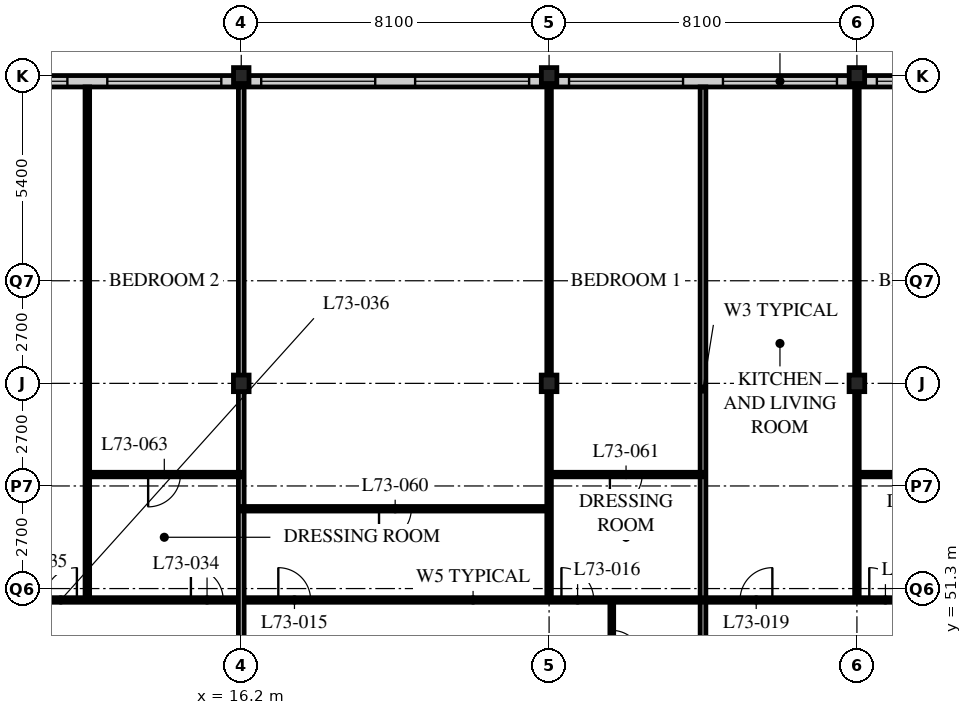
"""IFC4 building model, lengths in metres.
Left out: names, types, materials, properties, quantities, classifications, styles, units other than length and angle.
Written with IfcOpenShell. Run it as: python <this file> out.ifc"""

import sys

from ifc_helpers import new_model, si_unit, direction, frame, frame_2d, origin, origin_2d, place, context, subcontext, project, spatial, rectangle, i_section, extrude, element, fill, save


model = new_model("IFC4")
c1 = context("Model", 3, precision=1e-05, world=origin(), true_north=direction((0.0, 1.0)))
c2 = subcontext(c1, "Body", "Model", "MODEL_VIEW")
j1 = project(units=[si_unit("LENGTHUNIT", "METRE"), si_unit("PLANEANGLEUNIT", "RADIAN")], contexts=[c1])
p1 = place(None, origin())
s1 = spatial("IfcSite", under=j1, at=p1, CompositionType="ELEMENT")
p2 = place(p1, origin())
s2 = spatial("IfcBuilding", under=s1, at=p2, CompositionType="ELEMENT")
p3 = place(p2, frame((0.0, 0.0, 285.3)))
s3 = spatial("IfcBuildingStorey", under=s2, at=p3, CompositionType="ELEMENT", Elevation=285.3)
p4 = place(p3, frame((16.2, 56.7, 0.0), z_axis=(0.0, 0.0, 1.0), x_axis=(1.0, 0.0, 0.0)))
e1 = element("IfcColumn", 1, at=p4, inside=s3, PredefinedType="COLUMN", context=c2, shape_type="SweptSolid", body=[
    extrude(i_section(OverallWidth=0.412, OverallDepth=0.437, WebThickness=0.036, FlangeThickness=0.058, FilletRadius=0.015, at=origin_2d()), origin(), (0.0, 0.0, 1.0), 3.9),
])
p5 = place(p3, frame((16.2, 64.8, 0.0), z_axis=(0.0, 0.0, 1.0), x_axis=(1.0, 0.0, 0.0)))
e2 = element("IfcColumn", 2, at=p5, inside=s3, PredefinedType="COLUMN", context=c2, shape_type="SweptSolid", body=[
    extrude(i_section(OverallWidth=0.407, OverallDepth=0.419, WebThickness=0.031, FlangeThickness=0.049, FilletRadius=0.015, at=origin_2d()), origin(), (0.0, 0.0, 1.0), 3.9),
])
p6 = place(p3, frame((24.3, 56.7, 0.0), z_axis=(0.0, 0.0, 1.0), x_axis=(1.0, 0.0, 0.0)))
e3 = element("IfcColumn", 3, at=p6, inside=s3, PredefinedType="COLUMN", context=c2, shape_type="SweptSolid", body=[
    extrude(i_section(OverallWidth=0.412, OverallDepth=0.437, WebThickness=0.036, FlangeThickness=0.058, FilletRadius=0.015, at=origin_2d()), origin(), (0.0, 0.0, 1.0), 3.9),
])
p7 = place(p3, frame((24.3, 64.8, 0.0), z_axis=(0.0, 0.0, 1.0), x_axis=(1.0, 0.0, 0.0)))
e4 = element("IfcColumn", 4, at=p7, inside=s3, PredefinedType="COLUMN", context=c2, shape_type="SweptSolid", body=[
    extrude(i_section(OverallWidth=0.407, OverallDepth=0.419, WebThickness=0.031, FlangeThickness=0.049, FilletRadius=0.015, at=origin_2d()), origin(), (0.0, 0.0, 1.0), 3.9),
])
p8 = place(p3, frame((32.4, 56.7, 0.0), z_axis=(0.0, 0.0, 1.0), x_axis=(1.0, 0.0, 0.0)))
e5 = element("IfcColumn", 5, at=p8, inside=s3, PredefinedType="COLUMN", context=c2, shape_type="SweptSolid", body=[
    extrude(i_section(OverallWidth=0.412, OverallDepth=0.437, WebThickness=0.036, FlangeThickness=0.058, FilletRadius=0.015, at=origin_2d()), origin(), (0.0, 0.0, 1.0), 3.9),
])
p9 = place(p3, frame((32.4, 64.8, 0.0), z_axis=(0.0, 0.0, 1.0), x_axis=(1.0, 0.0, 0.0)))
e6 = element("IfcColumn", 6, at=p9, inside=s3, PredefinedType="COLUMN", context=c2, shape_type="SweptSolid", body=[
    extrude(i_section(OverallWidth=0.407, OverallDepth=0.419, WebThickness=0.031, FlangeThickness=0.049, FilletRadius=0.015, at=origin_2d()), origin(), (0.0, 0.0, 1.0), 3.9),
])
p10 = place(p3, frame((48.3, 64.65, 0.0), z_axis=(0.0, 0.0, 1.0), x_axis=(-1.0, 0.0, 0.0)))
e7 = element("IfcWall", 7, at=p10, inside=s3, PredefinedType="SOLIDWALL", context=c2, shape_type="SweptSolid", body=[
    extrude(rectangle(XDim=40.2, YDim=0.3, at=frame_2d((20.1, 0.0))), origin(), (0.0, 0.0, 1.0), 3.69),
])
p11 = place(p10, frame((0.225, 0.0, 0.6)))
e8 = element("IfcOpeningElement", 8, at=p11, cuts=e7, PredefinedType="OPENING", context=c2, shape_type="SweptSolid", body=[
    extrude(rectangle(XDim=3.0, YDim=2.4, at=frame_2d((1.5, 1.2))), frame((0.0, 0.16, 0.0), z_axis=(0.0, -1.0, 0.0), x_axis=(1.0, 0.0, 0.0)), (0.0, 0.0, 1.0), 0.32),
])
p12 = place(p10, frame((4.275, 0.0, 0.6)))
e9 = element("IfcOpeningElement", 9, at=p12, cuts=e7, PredefinedType="OPENING", context=c2, shape_type="SweptSolid", body=[
    extrude(rectangle(XDim=3.0, YDim=2.4, at=frame_2d((1.5, 1.2))), frame((0.0, 0.16, 0.0), z_axis=(0.0, -1.0, 0.0), x_axis=(1.0, 0.0, 0.0)), (0.0, 0.0, 1.0), 0.32),
])
p13 = place(p10, frame((8.325, 0.0, 0.6)))
e10 = element("IfcOpeningElement", 10, at=p13, cuts=e7, PredefinedType="OPENING", context=c2, shape_type="SweptSolid", body=[
    extrude(rectangle(XDim=3.0, YDim=2.4, at=frame_2d((1.5, 1.2))), frame((0.0, 0.16, 0.0), z_axis=(0.0, -1.0, 0.0), x_axis=(1.0, 0.0, 0.0)), (0.0, 0.0, 1.0), 0.32),
])
p14 = place(p10, frame((12.375, 0.0, 0.6)))
e11 = element("IfcOpeningElement", 11, at=p14, cuts=e7, PredefinedType="OPENING", context=c2, shape_type="SweptSolid", body=[
    extrude(rectangle(XDim=3.0, YDim=2.4, at=frame_2d((1.5, 1.2))), frame((0.0, 0.16, 0.0), z_axis=(0.0, -1.0, 0.0), x_axis=(1.0, 0.0, 0.0)), (0.0, 0.0, 1.0), 0.32),
])
p15 = place(p10, frame((16.425, 0.0, 0.6)))
e12 = element("IfcOpeningElement", 12, at=p15, cuts=e7, PredefinedType="OPENING", context=c2, shape_type="SweptSolid", body=[
    extrude(rectangle(XDim=3.0, YDim=2.4, at=frame_2d((1.5, 1.2))), frame((0.0, 0.16, 0.0), z_axis=(0.0, -1.0, 0.0), x_axis=(1.0, 0.0, 0.0)), (0.0, 0.0, 1.0), 0.32),
])
p16 = place(p10, frame((20.475, 0.0, 0.6)))
e13 = element("IfcOpeningElement", 13, at=p16, cuts=e7, PredefinedType="OPENING", context=c2, shape_type="SweptSolid", body=[
    extrude(rectangle(XDim=3.0, YDim=2.4, at=frame_2d((1.5, 1.2))), frame((0.0, 0.16, 0.0), z_axis=(0.0, -1.0, 0.0), x_axis=(1.0, 0.0, 0.0)), (0.0, 0.0, 1.0), 0.32),
])
p17 = place(p10, frame((24.525, 0.0, 0.6)))
e14 = element("IfcOpeningElement", 14, at=p17, cuts=e7, PredefinedType="OPENING", context=c2, shape_type="SweptSolid", body=[
    extrude(rectangle(XDim=3.0, YDim=2.4, at=frame_2d((1.5, 1.2))), frame((0.0, 0.16, 0.0), z_axis=(0.0, -1.0, 0.0), x_axis=(1.0, 0.0, 0.0)), (0.0, 0.0, 1.0), 0.32),
])
p18 = place(p10, frame((28.575, 0.0, 0.6)))
e15 = element("IfcOpeningElement", 15, at=p18, cuts=e7, PredefinedType="OPENING", context=c2, shape_type="SweptSolid", body=[
    extrude(rectangle(XDim=3.0, YDim=2.4, at=frame_2d((1.5, 1.2))), frame((0.0, 0.16, 0.0), z_axis=(0.0, -1.0, 0.0), x_axis=(1.0, 0.0, 0.0)), (0.0, 0.0, 1.0), 0.32),
])
p19 = place(p10, frame((32.625, 0.0, 0.6)))
e16 = element("IfcOpeningElement", 16, at=p19, cuts=e7, PredefinedType="OPENING", context=c2, shape_type="SweptSolid", body=[
    extrude(rectangle(XDim=3.0, YDim=2.4, at=frame_2d((1.5, 1.2))), frame((0.0, 0.16, 0.0), z_axis=(0.0, -1.0, 0.0), x_axis=(1.0, 0.0, 0.0)), (0.0, 0.0, 1.0), 0.32),
])
p20 = place(p10, frame((36.675, 0.0, 0.6)))
e17 = element("IfcOpeningElement", 17, at=p20, cuts=e7, PredefinedType="OPENING", context=c2, shape_type="SweptSolid", body=[
    extrude(rectangle(XDim=3.0, YDim=2.4, at=frame_2d((1.5, 1.2))), frame((0.0, 0.16, 0.0), z_axis=(0.0, -1.0, 0.0), x_axis=(1.0, 0.0, 0.0)), (0.0, 0.0, 1.0), 0.32),
])
p21 = place(p3, frame((25.95, 48.6, 0.0), z_axis=(0.0, 0.0, 1.0), x_axis=(0.0, 1.0, 0.0)))
e18 = element("IfcWall", 18, at=p21, inside=s3, PredefinedType="PARTITIONING", context=c2, shape_type="SweptSolid", body=[
    extrude(rectangle(XDim=2.4, YDim=0.1, at=frame_2d((1.2, 0.0))), origin(), (0.0, 0.0, 1.0), 3.69),
])
p22 = place(p21, frame((0.8, 0.0, 0.0)))
e19 = element("IfcOpeningElement", 19, at=p22, cuts=e18, PredefinedType="OPENING", context=c2, shape_type="SweptSolid", body=[
    extrude(rectangle(XDim=0.8, YDim=2.1, at=frame_2d((0.4, 1.05))), frame((0.0, 0.06, 0.0), z_axis=(0.0, -1.0, 0.0), x_axis=(1.0, 0.0, 0.0)), (0.0, 0.0, 1.0), 0.12),
])
p23 = place(p3, frame((24.3, 51.0, 0.0), z_axis=(0.0, 0.0, 1.0), x_axis=(0.0, 1.0, 0.0)))
e20 = element("IfcWall", 20, at=p23, inside=s3, PredefinedType="PARTITIONING", context=c2, shape_type="SweptSolid", body=[
    extrude(rectangle(XDim=13.5, YDim=0.12, at=frame_2d((6.75, 0.0))), origin(), (0.0, 0.0, 1.0), 3.078),
])
p24 = place(p3, frame((28.35, 48.6, 0.0), z_axis=(0.0, 0.0, 1.0), x_axis=(0.0, 1.0, 0.0)))
e21 = element("IfcWall", 21, at=p24, inside=s3, PredefinedType="PARTITIONING", context=c2, shape_type="SweptSolid", body=[
    extrude(rectangle(XDim=15.9, YDim=0.15, at=frame_2d((7.95, 0.0))), origin(), (0.0, 0.0, 1.0), 3.69),
])
p25 = place(p3, frame((32.4, 51.0, 0.0), z_axis=(0.0, 0.0, 1.0), x_axis=(0.0, 1.0, 0.0)))
e22 = element("IfcWall", 22, at=p25, inside=s3, PredefinedType="PARTITIONING", context=c2, shape_type="SweptSolid", body=[
    extrude(rectangle(XDim=13.5, YDim=0.12, at=frame_2d((6.75, 0.0))), origin(), (0.0, 0.0, 1.0), 3.078),
])
p26 = place(p3, frame((8.15, 51.0, 0.0), z_axis=(0.0, 0.0, 1.0), x_axis=(1.0, 0.0, 0.0)))
e23 = element("IfcWall", 23, at=p26, inside=s3, PredefinedType="PARTITIONING", context=c2, shape_type="SweptSolid", body=[
    extrude(rectangle(XDim=28.3, YDim=0.12, at=frame_2d((14.15, 0.0))), origin(), (0.0, 0.0, 1.0), 3.69),
])
p27 = place(p26, frame((9.025, 0.0, 0.0)))
e24 = element("IfcOpeningElement", 24, at=p27, cuts=e23, PredefinedType="OPENING", context=c2, shape_type="SweptSolid", body=[
    extrude(rectangle(XDim=0.85, YDim=2.1, at=frame_2d((0.425, 1.05))), frame((0.0, 0.07, 0.0), z_axis=(0.0, -1.0, 0.0), x_axis=(1.0, 0.0, 0.0)), (0.0, 0.0, 1.0), 0.14),
])
p28 = place(p26, frame((16.475, 0.0, 0.0)))
e25 = element("IfcOpeningElement", 25, at=p28, cuts=e23, PredefinedType="OPENING", context=c2, shape_type="SweptSolid", body=[
    extrude(rectangle(XDim=0.85, YDim=2.1, at=frame_2d((0.425, 1.05))), frame((0.0, 0.07, 0.0), z_axis=(0.0, -1.0, 0.0), x_axis=(1.0, 0.0, 0.0)), (0.0, 0.0, 1.0), 0.14),
])
p29 = place(p26, frame((21.175, 0.0, 0.0)))
e26 = element("IfcOpeningElement", 26, at=p29, cuts=e23, PredefinedType="OPENING", context=c2, shape_type="SweptSolid", body=[
    extrude(rectangle(XDim=0.85, YDim=2.1, at=frame_2d((0.425, 1.05))), frame((0.0, 0.07, 0.0), z_axis=(0.0, -1.0, 0.0), x_axis=(1.0, 0.0, 0.0)), (0.0, 0.0, 1.0), 0.14),
])
p30 = place(p26, frame((24.575, 0.0, 0.0)))
e27 = element("IfcOpeningElement", 27, at=p30, cuts=e23, PredefinedType="OPENING", context=c2, shape_type="SweptSolid", body=[
    extrude(rectangle(XDim=0.85, YDim=2.1, at=frame_2d((0.425, 1.05))), frame((0.0, 0.07, 0.0), z_axis=(0.0, -1.0, 0.0), x_axis=(1.0, 0.0, 0.0)), (0.0, 0.0, 1.0), 0.14),
])
p31 = place(p26, frame((6.725, 0.0, 0.0)))
e28 = element("IfcOpeningElement", 28, at=p31, cuts=e23, PredefinedType="OPENING", context=c2, shape_type="SweptSolid", body=[
    extrude(rectangle(XDim=0.85, YDim=2.1, at=frame_2d((0.425, 1.05))), frame((0.0, 0.07, 0.0), z_axis=(0.0, -1.0, 0.0), x_axis=(1.0, 0.0, 0.0)), (0.0, 0.0, 1.0), 0.14),
])
p32 = place(p26, frame((2.875, 0.0, 0.0)))
e29 = element("IfcOpeningElement", 29, at=p32, cuts=e23, PredefinedType="OPENING", context=c2, shape_type="SweptSolid", body=[
    extrude(rectangle(XDim=0.85, YDim=2.1, at=frame_2d((0.425, 1.05))), frame((0.0, 0.07, 0.0), z_axis=(0.0, -1.0, 0.0), x_axis=(1.0, 0.0, 0.0)), (0.0, 0.0, 1.0), 0.14),
])
p33 = place(p3, frame((12.15, 51.0, 0.0), z_axis=(0.0, 0.0, 1.0), x_axis=(0.0, 1.0, 0.0)))
e30 = element("IfcWall", 30, at=p33, inside=s3, PredefinedType="PARTITIONING", context=c2, shape_type="SweptSolid", body=[
    extrude(rectangle(XDim=13.5, YDim=0.12, at=frame_2d((6.75, 0.0))), origin(), (0.0, 0.0, 1.0), 3.69),
])
p34 = place(p3, frame((16.2, 48.6, 0.0), z_axis=(0.0, 0.0, 1.0), x_axis=(0.0, 1.0, 0.0)))
e31 = element("IfcWall", 31, at=p34, inside=s3, PredefinedType="PARTITIONING", context=c2, shape_type="SweptSolid", body=[
    extrude(rectangle(XDim=15.9, YDim=0.15, at=frame_2d((7.95, 0.0))), origin(), (0.0, 0.0, 1.0), 3.078),
])
p35 = place(p3, frame((16.2, 53.4, 0.0), z_axis=(0.0, 0.0, 1.0), x_axis=(1.0, 0.0, 0.0)))
e32 = element("IfcWall", 32, at=p35, inside=s3, PredefinedType="PARTITIONING", context=c2, shape_type="SweptSolid", body=[
    extrude(rectangle(XDim=8.1, YDim=0.12, at=frame_2d((4.05, 0.0))), origin(), (0.0, 0.0, 1.0), 3.69),
])
p36 = place(p35, frame((3.625, 0.0, 0.0)))
e33 = element("IfcOpeningElement", 33, at=p36, cuts=e32, PredefinedType="OPENING", context=c2, shape_type="SweptSolid", body=[
    extrude(rectangle(XDim=0.85, YDim=2.1, at=frame_2d((0.425, 1.05))), frame((0.0, 0.07, 0.0), z_axis=(0.0, -1.0, 0.0), x_axis=(1.0, 0.0, 0.0)), (0.0, 0.0, 1.0), 0.14),
])
p37 = place(p3, frame((24.3, 54.3, 0.0), z_axis=(0.0, 0.0, 1.0), x_axis=(1.0, 0.0, 0.0)))
e34 = element("IfcWall", 34, at=p37, inside=s3, PredefinedType="PARTITIONING", context=c2, shape_type="SweptSolid", body=[
    extrude(rectangle(XDim=4.05, YDim=0.12, at=frame_2d((2.025, 0.0))), origin(), (0.0, 0.0, 1.0), 3.69),
])
p38 = place(p37, frame((1.6, 0.0, 0.0)))
e35 = element("IfcOpeningElement", 35, at=p38, cuts=e34, PredefinedType="OPENING", context=c2, shape_type="SweptSolid", body=[
    extrude(rectangle(XDim=0.85, YDim=2.1, at=frame_2d((0.425, 1.05))), frame((0.0, 0.07, 0.0), z_axis=(0.0, -1.0, 0.0), x_axis=(1.0, 0.0, 0.0)), (0.0, 0.0, 1.0), 0.14),
])
p39 = place(p3, frame((32.4, 54.3, 0.0), z_axis=(0.0, 0.0, 1.0), x_axis=(1.0, 0.0, 0.0)))
e36 = element("IfcWall", 36, at=p39, inside=s3, PredefinedType="PARTITIONING", context=c2, shape_type="SweptSolid", body=[
    extrude(rectangle(XDim=4.05, YDim=0.12, at=frame_2d((2.025, 0.0))), origin(), (0.0, 0.0, 1.0), 3.69),
])
p40 = place(p39, frame((1.6, 0.0, 0.0)))
e37 = element("IfcOpeningElement", 37, at=p40, cuts=e36, PredefinedType="OPENING", context=c2, shape_type="SweptSolid", body=[
    extrude(rectangle(XDim=0.85, YDim=2.1, at=frame_2d((0.425, 1.05))), frame((0.0, 0.07, 0.0), z_axis=(0.0, -1.0, 0.0), x_axis=(1.0, 0.0, 0.0)), (0.0, 0.0, 1.0), 0.14),
])
p41 = place(p3, frame((12.15, 54.3, 0.0), z_axis=(0.0, 0.0, 1.0), x_axis=(1.0, 0.0, 0.0)))
e38 = element("IfcWall", 38, at=p41, inside=s3, PredefinedType="PARTITIONING", context=c2, shape_type="SweptSolid", body=[
    extrude(rectangle(XDim=4.05, YDim=0.12, at=frame_2d((2.025, 0.0))), origin(), (0.0, 0.0, 1.0), 3.69),
])
p42 = place(p41, frame((1.6, 0.0, 0.0)))
e39 = element("IfcOpeningElement", 39, at=p42, cuts=e38, PredefinedType="OPENING", context=c2, shape_type="SweptSolid", body=[
    extrude(rectangle(XDim=0.85, YDim=2.1, at=frame_2d((0.425, 1.05))), frame((0.0, 0.07, 0.0), z_axis=(0.0, -1.0, 0.0), x_axis=(1.0, 0.0, 0.0)), (0.0, 0.0, 1.0), 0.14),
])
p43 = place(p14, origin())
e40 = element("IfcWindow", 40, at=p43, inside=s3, PartitioningType="SINGLE_PANEL", PredefinedType="WINDOW", context=c2, shape_type="SweptSolid", body=[
    extrude(rectangle(XDim=3.0, YDim=2.4, at=frame_2d((1.5, 1.2))), frame((0.0, 0.03, 0.0), z_axis=(0.0, -1.0, 0.0), x_axis=(1.0, 0.0, 0.0)), (0.0, 0.0, 1.0), 0.06),
])
fill(e11, e40)
p44 = place(p15, origin())
e41 = element("IfcWindow", 41, at=p44, inside=s3, PartitioningType="SINGLE_PANEL", PredefinedType="WINDOW", context=c2, shape_type="SweptSolid", body=[
    extrude(rectangle(XDim=3.0, YDim=2.4, at=frame_2d((1.5, 1.2))), frame((0.0, 0.03, 0.0), z_axis=(0.0, -1.0, 0.0), x_axis=(1.0, 0.0, 0.0)), (0.0, 0.0, 1.0), 0.06),
])
fill(e12, e41)
p45 = place(p16, origin())
e42 = element("IfcWindow", 42, at=p45, inside=s3, PartitioningType="SINGLE_PANEL", PredefinedType="WINDOW", context=c2, shape_type="SweptSolid", body=[
    extrude(rectangle(XDim=3.0, YDim=2.4, at=frame_2d((1.5, 1.2))), frame((0.0, 0.03, 0.0), z_axis=(0.0, -1.0, 0.0), x_axis=(1.0, 0.0, 0.0)), (0.0, 0.0, 1.0), 0.06),
])
fill(e13, e42)
p46 = place(p17, origin())
e43 = element("IfcWindow", 43, at=p46, inside=s3, PartitioningType="SINGLE_PANEL", PredefinedType="WINDOW", context=c2, shape_type="SweptSolid", body=[
    extrude(rectangle(XDim=3.0, YDim=2.4, at=frame_2d((1.5, 1.2))), frame((0.0, 0.03, 0.0), z_axis=(0.0, -1.0, 0.0), x_axis=(1.0, 0.0, 0.0)), (0.0, 0.0, 1.0), 0.06),
])
fill(e14, e43)
p47 = place(p18, origin())
e44 = element("IfcWindow", 44, at=p47, inside=s3, PartitioningType="SINGLE_PANEL", PredefinedType="WINDOW", context=c2, shape_type="SweptSolid", body=[
    extrude(rectangle(XDim=3.0, YDim=2.4, at=frame_2d((1.5, 1.2))), frame((0.0, 0.03, 0.0), z_axis=(0.0, -1.0, 0.0), x_axis=(1.0, 0.0, 0.0)), (0.0, 0.0, 1.0), 0.06),
])
fill(e15, e44)
p48 = place(p19, origin())
e45 = element("IfcWindow", 45, at=p48, inside=s3, PartitioningType="SINGLE_PANEL", PredefinedType="WINDOW", context=c2, shape_type="SweptSolid", body=[
    extrude(rectangle(XDim=3.0, YDim=2.4, at=frame_2d((1.5, 1.2))), frame((0.0, 0.03, 0.0), z_axis=(0.0, -1.0, 0.0), x_axis=(1.0, 0.0, 0.0)), (0.0, 0.0, 1.0), 0.06),
])
fill(e16, e45)
p49 = place(p20, origin())
e46 = element("IfcWindow", 46, at=p49, inside=s3, PartitioningType="SINGLE_PANEL", PredefinedType="WINDOW", context=c2, shape_type="SweptSolid", body=[
    extrude(rectangle(XDim=3.0, YDim=2.4, at=frame_2d((1.5, 1.2))), frame((0.0, 0.03, 0.0), z_axis=(0.0, -1.0, 0.0), x_axis=(1.0, 0.0, 0.0)), (0.0, 0.0, 1.0), 0.06),
])
fill(e17, e46)
p50 = place(p22, origin())
e47 = element("IfcDoor", 47, at=p50, inside=s3, OperationType="SINGLE_SWING_RIGHT", PredefinedType="DOOR", context=c2, shape_type="SweptSolid", body=[
    extrude(rectangle(XDim=0.8, YDim=2.1, at=frame_2d((0.4, 1.05))), frame((0.0, 0.025, 0.0), z_axis=(0.0, -1.0, 0.0), x_axis=(1.0, 0.0, 0.0)), (0.0, 0.0, 1.0), 0.05),
])
fill(e19, e47)
p51 = place(p27, origin())
e48 = element("IfcDoor", 48, at=p51, inside=s3, OperationType="SINGLE_SWING_LEFT", PredefinedType="DOOR", context=c2, shape_type="SweptSolid", body=[
    extrude(rectangle(XDim=0.85, YDim=2.1, at=frame_2d((0.425, 1.05))), frame((0.0, 0.025, 0.0), z_axis=(0.0, -1.0, 0.0), x_axis=(1.0, 0.0, 0.0)), (0.0, 0.0, 1.0), 0.05),
])
fill(e24, e48)
p52 = place(p28, origin())
e49 = element("IfcDoor", 49, at=p52, inside=s3, OperationType="SINGLE_SWING_LEFT", PredefinedType="DOOR", context=c2, shape_type="SweptSolid", body=[
    extrude(rectangle(XDim=0.85, YDim=2.1, at=frame_2d((0.425, 1.05))), frame((0.0, 0.025, 0.0), z_axis=(0.0, -1.0, 0.0), x_axis=(1.0, 0.0, 0.0)), (0.0, 0.0, 1.0), 0.05),
])
fill(e25, e49)
p53 = place(p29, origin())
e50 = element("IfcDoor", 50, at=p53, inside=s3, OperationType="SINGLE_SWING_RIGHT", PredefinedType="DOOR", context=c2, shape_type="SweptSolid", body=[
    extrude(rectangle(XDim=0.85, YDim=2.1, at=frame_2d((0.425, 1.05))), frame((0.0, 0.025, 0.0), z_axis=(0.0, -1.0, 0.0), x_axis=(1.0, 0.0, 0.0)), (0.0, 0.0, 1.0), 0.05),
])
fill(e26, e50)
p54 = place(p30, origin())
e51 = element("IfcDoor", 51, at=p54, inside=s3, OperationType="SINGLE_SWING_LEFT", PredefinedType="DOOR", context=c2, shape_type="SweptSolid", body=[
    extrude(rectangle(XDim=0.85, YDim=2.1, at=frame_2d((0.425, 1.05))), frame((0.0, 0.025, 0.0), z_axis=(0.0, -1.0, 0.0), x_axis=(1.0, 0.0, 0.0)), (0.0, 0.0, 1.0), 0.05),
])
fill(e27, e51)
p55 = place(p31, origin())
e52 = element("IfcDoor", 52, at=p55, inside=s3, OperationType="SINGLE_SWING_LEFT", PredefinedType="DOOR", context=c2, shape_type="SweptSolid", body=[
    extrude(rectangle(XDim=0.85, YDim=2.1, at=frame_2d((0.425, 1.05))), frame((0.0, 0.025, 0.0), z_axis=(0.0, -1.0, 0.0), x_axis=(1.0, 0.0, 0.0)), (0.0, 0.0, 1.0), 0.05),
])
fill(e28, e52)
p56 = place(p32, origin())
e53 = element("IfcDoor", 53, at=p56, inside=s3, OperationType="SINGLE_SWING_RIGHT", PredefinedType="DOOR", context=c2, shape_type="SweptSolid", body=[
    extrude(rectangle(XDim=0.85, YDim=2.1, at=frame_2d((0.425, 1.05))), frame((0.0, 0.025, 0.0), z_axis=(0.0, -1.0, 0.0), x_axis=(1.0, 0.0, 0.0)), (0.0, 0.0, 1.0), 0.05),
])
fill(e29, e53)
p57 = place(p36, origin())
e54 = element("IfcDoor", 54, at=p57, inside=s3, OperationType="SINGLE_SWING_RIGHT", PredefinedType="DOOR", context=c2, shape_type="SweptSolid", body=[
    extrude(rectangle(XDim=0.85, YDim=2.1, at=frame_2d((0.425, 1.05))), frame((0.0, 0.025, 0.0), z_axis=(0.0, -1.0, 0.0), x_axis=(1.0, 0.0, 0.0)), (0.0, 0.0, 1.0), 0.05),
])
fill(e33, e54)
p58 = place(p38, origin())
e55 = element("IfcDoor", 55, at=p58, inside=s3, OperationType="SINGLE_SWING_RIGHT", PredefinedType="DOOR", context=c2, shape_type="SweptSolid", body=[
    extrude(rectangle(XDim=0.85, YDim=2.1, at=frame_2d((0.425, 1.05))), frame((0.0, 0.025, 0.0), z_axis=(0.0, -1.0, 0.0), x_axis=(1.0, 0.0, 0.0)), (0.0, 0.0, 1.0), 0.05),
])
fill(e35, e55)
p59 = place(p42, origin())
e56 = element("IfcDoor", 56, at=p59, inside=s3, OperationType="SINGLE_SWING_RIGHT", PredefinedType="DOOR", context=c2, shape_type="SweptSolid", body=[
    extrude(rectangle(XDim=0.85, YDim=2.1, at=frame_2d((0.425, 1.05))), frame((0.0, 0.025, 0.0), z_axis=(0.0, -1.0, 0.0), x_axis=(1.0, 0.0, 0.0)), (0.0, 0.0, 1.0), 0.05),
])
fill(e39, e56)
save(model, sys.argv[1])
